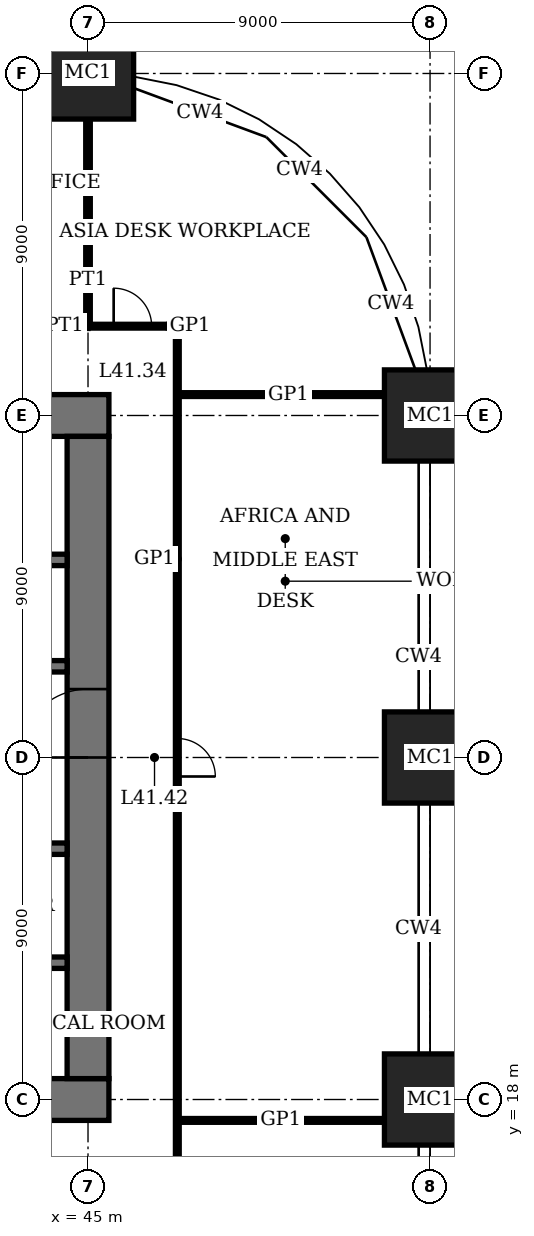
"""IFC4 building model, lengths in metres.
Left out: names, types, materials, properties, quantities, classifications, styles, units other than length and angle.
Written with IfcOpenShell. Run it as: python <this file> out.ifc"""

import sys

from ifc_helpers import new_model, si_unit, direction, frame, frame_2d, origin, origin_2d, place, context, subcontext, project, spatial, rectangle, extrude, element, fill, save


model = new_model("IFC4")
c1 = context("Model", 3, precision=1e-05, world=origin(), true_north=direction((0.0, 1.0)))
c2 = subcontext(c1, "Body", "Model", "MODEL_VIEW")
j1 = project(units=[si_unit("LENGTHUNIT", "METRE"), si_unit("PLANEANGLEUNIT", "RADIAN")], contexts=[c1])
p1 = place(None, origin())
s1 = spatial("IfcSite", under=j1, at=p1, CompositionType="ELEMENT")
p2 = place(p1, origin())
s2 = spatial("IfcBuilding", under=s1, at=p2, CompositionType="ELEMENT")
p3 = place(p2, frame((0.0, 0.0, 170.2)))
s3 = spatial("IfcBuildingStorey", under=s2, at=p3, CompositionType="ELEMENT", Elevation=170.2)
for number, where, z_axis, x_axis in (
    (1, (45.0, 45.0, 0.0), (0.0, 0.0, 1.0), (1.0, 0.0, 0.0)),
    (2, (54.0, 18.0, 0.0), (0.0, 0.0, 1.0), (1.0, 0.0, 0.0)),
    (3, (54.0, 27.0, 0.0), (0.0, 0.0, 1.0), (1.0, 0.0, 0.0)),
    (4, (54.0, 36.0, 0.0), (0.0, 0.0, 1.0), (1.0, 0.0, 0.0)),
):
    element("IfcColumn", number, at=place(p3, frame(where, z_axis=z_axis, x_axis=x_axis)), inside=s3, PredefinedType="COLUMN", context=c2, shape_type="SweptSolid", body=[
        extrude(rectangle(XDim=2.4, YDim=2.4, at=origin_2d()), origin(), (0.0, 0.0, 1.0), 4.0),
    ])
p4 = place(p3, frame((17.45, 18.0, 0.0), z_axis=(0.0, 0.0, 1.0), x_axis=(1.0, 0.0, 0.0)))
e5 = element("IfcWall", 5, at=p4, inside=s3, PredefinedType="SHEAR", context=c2, shape_type="SweptSolid", body=[
    extrude(rectangle(XDim=28.1, YDim=1.1, at=frame_2d((14.05, 0.0))), origin(), (0.0, 0.0, 1.0), 4.0),
])
p5 = place(p4, frame((11.55, 0.0, 0.0)))
e6 = element("IfcOpeningElement", 6, at=p5, cuts=e5, PredefinedType="OPENING", context=c2, shape_type="SweptSolid", body=[
    extrude(rectangle(XDim=1.0, YDim=2.4, at=frame_2d((0.5, 1.2))), frame((0.0, 0.56, 0.0), z_axis=(0.0, -1.0, 0.0), x_axis=(1.0, 0.0, 0.0)), (0.0, 0.0, 1.0), 1.12),
])
p6 = place(p4, frame((16.55, 0.0, 0.0)))
e7 = element("IfcOpeningElement", 7, at=p6, cuts=e5, PredefinedType="OPENING", context=c2, shape_type="SweptSolid", body=[
    extrude(rectangle(XDim=1.0, YDim=2.4, at=frame_2d((0.5, 1.2))), frame((0.0, 0.56, 0.0), z_axis=(0.0, -1.0, 0.0), x_axis=(1.0, 0.0, 0.0)), (0.0, 0.0, 1.0), 1.12),
])
p7 = place(p4, frame((20.0, 0.0, 0.0)))
e8 = element("IfcOpeningElement", 8, at=p7, cuts=e5, PredefinedType="OPENING", context=c2, shape_type="SweptSolid", body=[
    extrude(rectangle(XDim=1.1, YDim=2.4, at=frame_2d((0.55, 1.2))), frame((0.0, 0.56, 0.0), z_axis=(0.0, -1.0, 0.0), x_axis=(1.0, 0.0, 0.0)), (0.0, 0.0, 1.0), 1.12),
])
p8 = place(p4, frame((24.05, 0.0, 0.0)))
e9 = element("IfcOpeningElement", 9, at=p8, cuts=e5, PredefinedType="OPENING", context=c2, shape_type="SweptSolid", body=[
    extrude(rectangle(XDim=1.0, YDim=2.4, at=frame_2d((0.5, 1.2))), frame((0.0, 0.56, 0.0), z_axis=(0.0, -1.0, 0.0), x_axis=(1.0, 0.0, 0.0)), (0.0, 0.0, 1.0), 1.12),
])
p9 = place(p3, frame((45.55, 36.0, 0.0), z_axis=(0.0, 0.0, 1.0), x_axis=(-1.0, 0.0, 0.0)))
e10 = element("IfcWall", 10, at=p9, inside=s3, PredefinedType="SHEAR", context=c2, shape_type="SweptSolid", body=[
    extrude(rectangle(XDim=28.1, YDim=1.1, at=frame_2d((14.05, 0.0))), origin(), (0.0, 0.0, 1.0), 4.0),
])
p10 = place(p9, frame((11.55, 0.0, 0.0)))
e11 = element("IfcOpeningElement", 11, at=p10, cuts=e10, PredefinedType="OPENING", context=c2, shape_type="SweptSolid", body=[
    extrude(rectangle(XDim=1.0, YDim=2.4, at=frame_2d((0.5, 1.2))), frame((0.0, 0.56, 0.0), z_axis=(0.0, -1.0, 0.0), x_axis=(1.0, 0.0, 0.0)), (0.0, 0.0, 1.0), 1.12),
])
p11 = place(p9, frame((16.55, 0.0, 0.0)))
e12 = element("IfcOpeningElement", 12, at=p11, cuts=e10, PredefinedType="OPENING", context=c2, shape_type="SweptSolid", body=[
    extrude(rectangle(XDim=1.0, YDim=2.4, at=frame_2d((0.5, 1.2))), frame((0.0, 0.56, 0.0), z_axis=(0.0, -1.0, 0.0), x_axis=(1.0, 0.0, 0.0)), (0.0, 0.0, 1.0), 1.12),
])
p12 = place(p9, frame((20.0, 0.0, 0.0)))
e13 = element("IfcOpeningElement", 13, at=p12, cuts=e10, PredefinedType="OPENING", context=c2, shape_type="SweptSolid", body=[
    extrude(rectangle(XDim=1.1, YDim=2.4, at=frame_2d((0.55, 1.2))), frame((0.0, 0.56, 0.0), z_axis=(0.0, -1.0, 0.0), x_axis=(1.0, 0.0, 0.0)), (0.0, 0.0, 1.0), 1.12),
])
p13 = place(p9, frame((24.05, 0.0, 0.0)))
e14 = element("IfcOpeningElement", 14, at=p13, cuts=e10, PredefinedType="OPENING", context=c2, shape_type="SweptSolid", body=[
    extrude(rectangle(XDim=1.0, YDim=2.4, at=frame_2d((0.5, 1.2))), frame((0.0, 0.56, 0.0), z_axis=(0.0, -1.0, 0.0), x_axis=(1.0, 0.0, 0.0)), (0.0, 0.0, 1.0), 1.12),
])
p14 = place(p3, frame((45.0, 18.55, 0.0), z_axis=(0.0, 0.0, 1.0), x_axis=(0.0, 1.0, 0.0)))
e15 = element("IfcWall", 15, at=p14, inside=s3, PredefinedType="SHEAR", context=c2, shape_type="SweptSolid", body=[
    extrude(rectangle(XDim=16.9, YDim=1.1, at=frame_2d((8.45, 0.0))), origin(), (0.0, 0.0, 1.0), 4.0),
])
p15 = place(p14, frame((8.45, 0.0, 0.0)))
e16 = element("IfcOpeningElement", 16, at=p15, cuts=e15, PredefinedType="OPENING", context=c2, shape_type="SweptSolid", body=[
    extrude(rectangle(XDim=1.8, YDim=2.4, at=frame_2d((0.9, 1.2))), frame((0.0, 0.56, 0.0), z_axis=(0.0, -1.0, 0.0), x_axis=(1.0, 0.0, 0.0)), (0.0, 0.0, 1.0), 1.12),
])
p16 = place(p3, frame((36.15, 32.2, 0.0), z_axis=(0.0, 0.0, 1.0), x_axis=(1.0, 0.0, 0.0)))
e17 = element("IfcWall", 17, at=p16, inside=s3, PredefinedType="SHEAR", context=c2, shape_type="SweptSolid", body=[
    extrude(rectangle(XDim=8.3, YDim=0.3, at=frame_2d((4.15, 0.0))), origin(), (0.0, 0.0, 1.0), 4.0),
])
p17 = place(p16, frame((0.45, 0.0, 0.0)))
e18 = element("IfcOpeningElement", 18, at=p17, cuts=e17, PredefinedType="OPENING", context=c2, shape_type="SweptSolid", body=[
    extrude(rectangle(XDim=1.0, YDim=2.4, at=frame_2d((0.5, 1.2))), frame((0.0, 0.16, 0.0), z_axis=(0.0, -1.0, 0.0), x_axis=(1.0, 0.0, 0.0)), (0.0, 0.0, 1.0), 0.32),
])
p18 = place(p3, frame((18.55, 24.6, 0.0), z_axis=(0.0, 0.0, 1.0), x_axis=(1.0, 0.0, 0.0)))
e19 = element("IfcWall", 19, at=p18, inside=s3, PredefinedType="SHEAR", context=c2, shape_type="SweptSolid", body=[
    extrude(rectangle(XDim=25.9, YDim=0.3, at=frame_2d((12.95, 0.0))), origin(), (0.0, 0.0, 1.0), 4.0),
])
p19 = place(p18, frame((4.95, 0.0, 0.0)))
e20 = element("IfcOpeningElement", 20, at=p19, cuts=e19, PredefinedType="OPENING", context=c2, shape_type="SweptSolid", body=[
    extrude(rectangle(XDim=1.0, YDim=2.4, at=frame_2d((0.5, 1.2))), frame((0.0, 0.16, 0.0), z_axis=(0.0, -1.0, 0.0), x_axis=(1.0, 0.0, 0.0)), (0.0, 0.0, 1.0), 0.32),
])
p20 = place(p18, frame((24.5, 0.0, 0.0)))
e21 = element("IfcOpeningElement", 21, at=p20, cuts=e19, PredefinedType="OPENING", context=c2, shape_type="SweptSolid", body=[
    extrude(rectangle(XDim=0.9, YDim=2.1, at=frame_2d((0.45, 1.05))), frame((0.0, 0.16, 0.0), z_axis=(0.0, -1.0, 0.0), x_axis=(1.0, 0.0, 0.0)), (0.0, 0.0, 1.0), 0.32),
])
p21 = place(p18, frame((21.3, 0.0, 0.0)))
e22 = element("IfcOpeningElement", 22, at=p21, cuts=e19, PredefinedType="OPENING", context=c2, shape_type="SweptSolid", body=[
    extrude(rectangle(XDim=1.3, YDim=2.4, at=frame_2d((0.65, 1.2))), frame((0.0, 0.16, 0.0), z_axis=(0.0, -1.0, 0.0), x_axis=(1.0, 0.0, 0.0)), (0.0, 0.0, 1.0), 0.32),
])
p22 = place(p3, frame((18.55, 29.4, 0.0), z_axis=(0.0, 0.0, 1.0), x_axis=(1.0, 0.0, 0.0)))
e23 = element("IfcWall", 23, at=p22, inside=s3, PredefinedType="SHEAR", context=c2, shape_type="SweptSolid", body=[
    extrude(rectangle(XDim=25.9, YDim=0.3, at=frame_2d((12.95, 0.0))), origin(), (0.0, 0.0, 1.0), 4.0),
])
p23 = place(p22, frame((19.95, 0.0, 0.0)))
e24 = element("IfcOpeningElement", 24, at=p23, cuts=e23, PredefinedType="OPENING", context=c2, shape_type="SweptSolid", body=[
    extrude(rectangle(XDim=1.0, YDim=2.4, at=frame_2d((0.5, 1.2))), frame((0.0, 0.16, 0.0), z_axis=(0.0, -1.0, 0.0), x_axis=(1.0, 0.0, 0.0)), (0.0, 0.0, 1.0), 0.32),
])
p24 = place(p22, frame((0.5, 0.0, 0.0)))
e25 = element("IfcOpeningElement", 25, at=p24, cuts=e23, PredefinedType="OPENING", context=c2, shape_type="SweptSolid", body=[
    extrude(rectangle(XDim=0.9, YDim=2.1, at=frame_2d((0.45, 1.05))), frame((0.0, 0.16, 0.0), z_axis=(0.0, -1.0, 0.0), x_axis=(1.0, 0.0, 0.0)), (0.0, 0.0, 1.0), 0.32),
])
p25 = place(p22, frame((15.45, 0.0, 0.0)))
e26 = element("IfcOpeningElement", 26, at=p25, cuts=e23, PredefinedType="OPENING", context=c2, shape_type="SweptSolid", body=[
    extrude(rectangle(XDim=1.0, YDim=2.4, at=frame_2d((0.5, 1.2))), frame((0.0, 0.16, 0.0), z_axis=(0.0, -1.0, 0.0), x_axis=(1.0, 0.0, 0.0)), (0.0, 0.0, 1.0), 0.32),
])
p26 = place(p22, frame((12.45, 0.0, 0.0)))
e27 = element("IfcOpeningElement", 27, at=p26, cuts=e23, PredefinedType="OPENING", context=c2, shape_type="SweptSolid", body=[
    extrude(rectangle(XDim=1.0, YDim=2.4, at=frame_2d((0.5, 1.2))), frame((0.0, 0.16, 0.0), z_axis=(0.0, -1.0, 0.0), x_axis=(1.0, 0.0, 0.0)), (0.0, 0.0, 1.0), 0.32),
])
p27 = place(p22, frame((9.4, 0.0, 0.0)))
e28 = element("IfcOpeningElement", 28, at=p27, cuts=e23, PredefinedType="OPENING", context=c2, shape_type="SweptSolid", body=[
    extrude(rectangle(XDim=1.1, YDim=2.4, at=frame_2d((0.55, 1.2))), frame((0.0, 0.16, 0.0), z_axis=(0.0, -1.0, 0.0), x_axis=(1.0, 0.0, 0.0)), (0.0, 0.0, 1.0), 0.32),
])
p28 = place(p22, frame((6.4, 0.0, 0.0)))
e29 = element("IfcOpeningElement", 29, at=p28, cuts=e23, PredefinedType="OPENING", context=c2, shape_type="SweptSolid", body=[
    extrude(rectangle(XDim=1.1, YDim=2.4, at=frame_2d((0.55, 1.2))), frame((0.0, 0.16, 0.0), z_axis=(0.0, -1.0, 0.0), x_axis=(1.0, 0.0, 0.0)), (0.0, 0.0, 1.0), 0.32),
])
p29 = place(p22, frame((3.3, 0.0, 0.0)))
e30 = element("IfcOpeningElement", 30, at=p29, cuts=e23, PredefinedType="OPENING", context=c2, shape_type="SweptSolid", body=[
    extrude(rectangle(XDim=1.3, YDim=2.4, at=frame_2d((0.65, 1.2))), frame((0.0, 0.16, 0.0), z_axis=(0.0, -1.0, 0.0), x_axis=(1.0, 0.0, 0.0)), (0.0, 0.0, 1.0), 0.32),
])
p30 = place(p3, frame((27.15, 21.6, 0.0), z_axis=(0.0, 0.0, 1.0), x_axis=(1.0, 0.0, 0.0)))
e31 = element("IfcWall", 31, at=p30, inside=s3, PredefinedType="SHEAR", context=c2, shape_type="SweptSolid", body=[
    extrude(rectangle(XDim=17.3, YDim=0.3, at=frame_2d((8.65, 0.0))), origin(), (0.0, 0.0, 1.0), 4.0),
])
for number, where, z_axis, x_axis in (
    (32, (47.35, 17.45, 0.0), (0.0, 0.0, 1.0), (1.0, 0.0, 0.0)),
    (33, (47.35, 36.55, 0.0), (0.0, 0.0, 1.0), (1.0, 0.0, 0.0)),
):
    element("IfcWall", number, at=place(p3, frame(where, z_axis=z_axis, x_axis=x_axis)), inside=s3, PredefinedType="PARTITIONING", context=c2, shape_type="SweptSolid", body=[
        extrude(rectangle(XDim=5.45, YDim=0.1, at=frame_2d((2.725, 0.0))), origin(), (0.0, 0.0, 1.0), 3.75),
    ])
p31 = place(p3, frame((40.5, 38.35, 0.0), z_axis=(0.0, 0.0, 1.0), x_axis=(1.0, 0.0, 0.0)))
e34 = element("IfcWall", 34, at=p31, inside=s3, PredefinedType="PARTITIONING", context=c2, shape_type="SweptSolid", body=[
    extrude(rectangle(XDim=4.5, YDim=0.12, at=frame_2d((2.25, 0.0))), origin(), (0.0, 0.0, 1.0), 3.75),
])
p32 = place(p31, frame((1.75, 0.0, 0.0)))
e35 = element("IfcOpeningElement", 35, at=p32, cuts=e34, PredefinedType="OPENING", context=c2, shape_type="SweptSolid", body=[
    extrude(rectangle(XDim=1.0, YDim=2.4, at=frame_2d((0.5, 1.2))), frame((0.0, 0.07, 0.0), z_axis=(0.0, -1.0, 0.0), x_axis=(1.0, 0.0, 0.0)), (0.0, 0.0, 1.0), 0.14),
])
p33 = place(p3, frame((45.0, 38.35, 0.0), z_axis=(0.0, 0.0, 1.0), x_axis=(1.0, 0.0, 0.0)))
e36 = element("IfcWall", 36, at=p33, inside=s3, PredefinedType="PARTITIONING", context=c2, shape_type="SweptSolid", body=[
    extrude(rectangle(XDim=2.35, YDim=0.1, at=frame_2d((1.175, 0.0))), origin(), (0.0, 0.0, 1.0), 3.75),
])
p34 = place(p33, frame((0.675, 0.0, 0.0)))
e37 = element("IfcOpeningElement", 37, at=p34, cuts=e36, PredefinedType="OPENING", context=c2, shape_type="SweptSolid", body=[
    extrude(rectangle(XDim=1.0, YDim=2.4, at=frame_2d((0.5, 1.2))), frame((0.0, 0.06, 0.0), z_axis=(0.0, -1.0, 0.0), x_axis=(1.0, 0.0, 0.0)), (0.0, 0.0, 1.0), 0.12),
])
p35 = place(p3, frame((45.0, 38.35, 0.0), z_axis=(0.0, 0.0, 1.0), x_axis=(0.0, 1.0, 0.0)))
e38 = element("IfcWall", 38, at=p35, inside=s3, PredefinedType="PARTITIONING", context=c2, shape_type="SweptSolid", body=[
    extrude(rectangle(XDim=5.45, YDim=0.12, at=frame_2d((2.725, 0.0))), origin(), (0.0, 0.0, 1.0), 3.05),
])
p36 = place(p3, frame((47.35, 15.65, 0.0), z_axis=(0.0, 0.0, 1.0), x_axis=(0.0, 1.0, 0.0)))
e39 = element("IfcWall", 39, at=p36, inside=s3, PredefinedType="PARTITIONING", context=c2, shape_type="SweptSolid", body=[
    extrude(rectangle(XDim=22.7, YDim=0.1, at=frame_2d((11.35, 0.0))), origin(), (0.0, 0.0, 1.0), 3.75),
])
p37 = place(p36, frame((10.85, 0.0, 0.0)))
e40 = element("IfcOpeningElement", 40, at=p37, cuts=e39, PredefinedType="OPENING", context=c2, shape_type="SweptSolid", body=[
    extrude(rectangle(XDim=1.0, YDim=2.4, at=frame_2d((0.5, 1.2))), frame((0.0, 0.06, 0.0), z_axis=(0.0, -1.0, 0.0), x_axis=(1.0, 0.0, 0.0)), (0.0, 0.0, 1.0), 0.12),
])
p38 = place(p15, origin())
e41 = element("IfcDoor", 41, at=p38, inside=s3, OperationType="DOUBLE_DOOR_DOUBLE_SWING", PredefinedType="DOOR", context=c2, shape_type="SweptSolid", body=[
    extrude(rectangle(XDim=1.8, YDim=2.4, at=frame_2d((0.9, 1.2))), frame((0.0, 0.03, 0.0), z_axis=(0.0, -1.0, 0.0), x_axis=(1.0, 0.0, 0.0)), (0.0, 0.0, 1.0), 0.06),
    extrude(rectangle(XDim=0.04, YDim=2.4, at=frame_2d((0.02, 1.2))), frame((0.0, 0.55, 0.0), z_axis=(0.0, -1.0, 0.0), x_axis=(1.0, 0.0, 0.0)), (0.0, 0.0, 1.0), 1.1),
    extrude(rectangle(XDim=0.04, YDim=2.4, at=frame_2d((1.78, 1.2))), frame((0.0, 0.55, 0.0), z_axis=(0.0, -1.0, 0.0), x_axis=(1.0, 0.0, 0.0)), (0.0, 0.0, 1.0), 1.1),
    extrude(rectangle(XDim=1.8, YDim=0.04, at=frame_2d((0.9, 2.38))), frame((0.0, 0.55, 0.0), z_axis=(0.0, -1.0, 0.0), x_axis=(1.0, 0.0, 0.0)), (0.0, 0.0, 1.0), 1.1),
])
fill(e16, e41)
p39 = place(p34, origin())
e42 = element("IfcDoor", 42, at=p39, inside=s3, OperationType="SINGLE_SWING_RIGHT", PredefinedType="DOOR", context=c2, shape_type="SweptSolid", body=[
    extrude(rectangle(XDim=1.0, YDim=2.4, at=frame_2d((0.5, 1.2))), frame((0.0, 0.02, 0.0), z_axis=(0.0, -1.0, 0.0), x_axis=(1.0, 0.0, 0.0)), (0.0, 0.0, 1.0), 0.04),
])
fill(e37, e42)
p40 = place(p37, origin())
e43 = element("IfcDoor", 43, at=p40, inside=s3, OperationType="SINGLE_SWING_LEFT", PredefinedType="DOOR", context=c2, shape_type="SweptSolid", body=[
    extrude(rectangle(XDim=1.0, YDim=2.4, at=frame_2d((0.5, 1.2))), frame((0.0, 0.02, 0.0), z_axis=(0.0, -1.0, 0.0), x_axis=(1.0, 0.0, 0.0)), (0.0, 0.0, 1.0), 0.04),
])
fill(e40, e43)
save(model, sys.argv[1])
